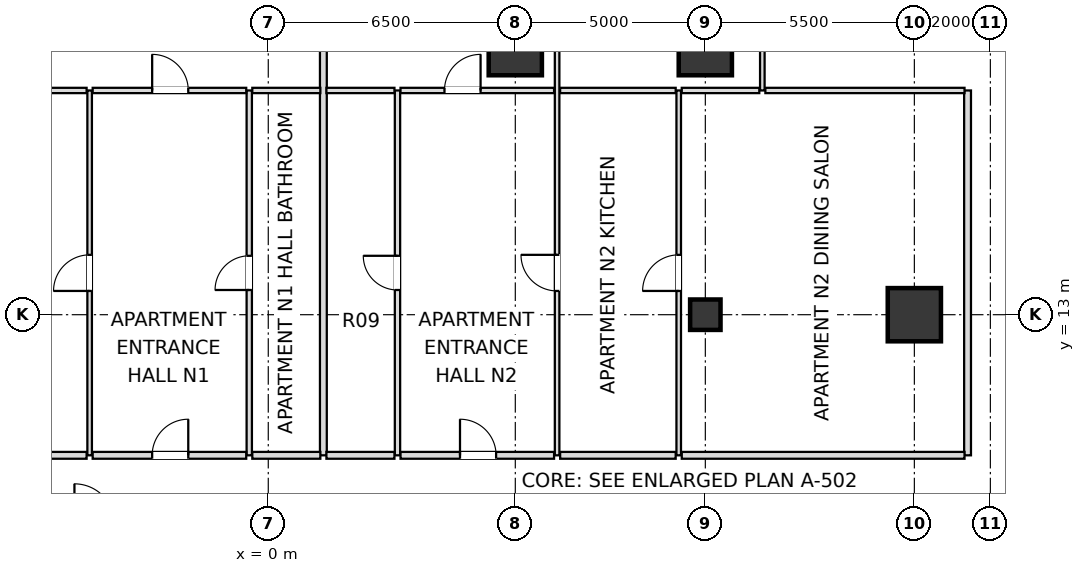
"""IFC4 building model, lengths in metres.
Left out: names, types, materials, properties, quantities, classifications, styles, units other than length and angle.
Written with IfcOpenShell. Run it as: python <this file> out.ifc"""

import sys

from ifc_helpers import new_model, si_unit, direction, frame, frame_2d, origin, origin_2d, place, context, subcontext, project, spatial, rectangle, extrude, element, fill, save


model = new_model("IFC4")
c1 = context("Model", 3, precision=1e-05, world=origin(), true_north=direction((0.0, 1.0)))
c2 = subcontext(c1, "Body", "Model", "MODEL_VIEW")
j1 = project(units=[si_unit("LENGTHUNIT", "METRE"), si_unit("PLANEANGLEUNIT", "RADIAN")], contexts=[c1])
p1 = place(None, origin())
s1 = spatial("IfcSite", under=j1, at=p1, CompositionType="ELEMENT")
p2 = place(p1, origin())
s2 = spatial("IfcBuilding", under=s1, at=p2, CompositionType="ELEMENT")
p3 = place(p2, frame((0.0, 0.0, 27.6)))
s3 = spatial("IfcBuildingStorey", under=s2, at=p3, CompositionType="ELEMENT", Elevation=27.6)
for number, where, z_axis, x_axis in (
    (1, (17.0, 13.0, 0.0), (0.0, 0.0, 1.0), (1.0, 0.0, 0.0)),
    (2, (11.5, 20.0, 0.0), (0.0, 0.0, 1.0), (1.0, 0.0, 0.0)),
    (3, (6.5, 20.0, 0.0), (0.0, 0.0, 1.0), (1.0, 0.0, 0.0)),
):
    element("IfcColumn", number, at=place(p3, frame(where, z_axis=z_axis, x_axis=x_axis)), inside=s3, PredefinedType="USERDEFINED", context=c2, shape_type="SweptSolid", body=[
        extrude(rectangle(XDim=1.4, YDim=1.4, at=origin_2d()), origin(), (0.0, 0.0, 1.0), 4.8),
    ])
p4 = place(p3, frame((11.5, 13.0, 0.0), z_axis=(0.0, 0.0, 1.0), x_axis=(1.0, 0.0, 0.0)))
e4 = element("IfcColumn", 4, at=p4, inside=s3, PredefinedType="COLUMN", context=c2, shape_type="SweptSolid", body=[
    extrude(rectangle(XDim=0.8, YDim=0.8, at=origin_2d()), origin(), (0.0, 0.0, 1.0), 4.8),
])
p5 = place(p3, frame((-4.7, 9.3, 0.0), z_axis=(0.0, 0.0, 1.0), x_axis=(0.0, 1.0, 0.0)))
e5 = element("IfcWall", 5, at=p5, inside=s3, PredefinedType="PARTITIONING", context=c2, shape_type="SweptSolid", body=[
    extrude(rectangle(XDim=9.6, YDim=0.12, at=frame_2d((4.8, 0.0))), origin(), (0.0, 0.0, 1.0), 4.148),
])
p6 = place(p5, frame((4.325, 0.0, 0.0)))
e6 = element("IfcOpeningElement", 6, at=p6, cuts=e5, PredefinedType="OPENING", context=c2, shape_type="SweptSolid", body=[
    extrude(rectangle(XDim=0.95, YDim=2.1, at=frame_2d((0.475, 1.05))), frame((0.0, 0.07, 0.0), z_axis=(0.0, -1.0, 0.0), x_axis=(1.0, 0.0, 0.0)), (0.0, 0.0, 1.0), 0.14),
])
p7 = place(p3, frame((-0.5, 9.3, 0.0), z_axis=(0.0, 0.0, 1.0), x_axis=(0.0, 1.0, 0.0)))
e7 = element("IfcWall", 7, at=p7, inside=s3, PredefinedType="PARTITIONING", context=c2, shape_type="SweptSolid", body=[
    extrude(rectangle(XDim=9.6, YDim=0.14, at=frame_2d((4.8, 0.0))), origin(), (0.0, 0.0, 1.0), 4.148),
])
p8 = place(p7, frame((4.35, 0.0, 0.0)))
e8 = element("IfcOpeningElement", 8, at=p8, cuts=e7, PredefinedType="OPENING", context=c2, shape_type="SweptSolid", body=[
    extrude(rectangle(XDim=0.9, YDim=2.1, at=frame_2d((0.45, 1.05))), frame((0.0, 0.08, 0.0), z_axis=(0.0, -1.0, 0.0), x_axis=(1.0, 0.0, 0.0)), (0.0, 0.0, 1.0), 0.16),
])
p9 = place(p3, frame((1.45, 9.3, 0.0), z_axis=(0.0, 0.0, 1.0), x_axis=(0.0, 1.0, 0.0)))
e9 = element("IfcWall", 9, at=p9, inside=s3, PredefinedType="PARTITIONING", context=c2, shape_type="SweptSolid", body=[
    extrude(rectangle(XDim=15.6, YDim=0.18, at=frame_2d((7.8, 0.0))), origin(), (0.0, 0.0, 1.0), 4.016),
])
p10 = place(p3, frame((3.4, 9.3, 0.0), z_axis=(0.0, 0.0, 1.0), x_axis=(0.0, 1.0, 0.0)))
e10 = element("IfcWall", 10, at=p10, inside=s3, PredefinedType="PARTITIONING", context=c2, shape_type="SweptSolid", body=[
    extrude(rectangle(XDim=9.6, YDim=0.14, at=frame_2d((4.8, 0.0))), origin(), (0.0, 0.0, 1.0), 4.148),
])
p11 = place(p10, frame((4.35, 0.0, 0.0)))
e11 = element("IfcOpeningElement", 11, at=p11, cuts=e10, PredefinedType="OPENING", context=c2, shape_type="SweptSolid", body=[
    extrude(rectangle(XDim=0.9, YDim=2.1, at=frame_2d((0.45, 1.05))), frame((0.0, 0.08, 0.0), z_axis=(0.0, -1.0, 0.0), x_axis=(1.0, 0.0, 0.0)), (0.0, 0.0, 1.0), 0.16),
])
p12 = place(p3, frame((7.6, 9.3, 0.0), z_axis=(0.0, 0.0, 1.0), x_axis=(0.0, 1.0, 0.0)))
e12 = element("IfcWall", 12, at=p12, inside=s3, PredefinedType="PARTITIONING", context=c2, shape_type="SweptSolid", body=[
    extrude(rectangle(XDim=15.6, YDim=0.12, at=frame_2d((7.8, 0.0))), origin(), (0.0, 0.0, 1.0), 4.016),
])
p13 = place(p12, frame((4.325, 0.0, 0.0)))
e13 = element("IfcOpeningElement", 13, at=p13, cuts=e12, PredefinedType="OPENING", context=c2, shape_type="SweptSolid", body=[
    extrude(rectangle(XDim=0.95, YDim=2.1, at=frame_2d((0.475, 1.05))), frame((0.0, 0.07, 0.0), z_axis=(0.0, -1.0, 0.0), x_axis=(1.0, 0.0, 0.0)), (0.0, 0.0, 1.0), 0.14),
])
p14 = place(p12, frame((12.15, 0.0, 0.0)))
e14 = element("IfcOpeningElement", 14, at=p14, cuts=e12, PredefinedType="OPENING", context=c2, shape_type="SweptSolid", body=[
    extrude(rectangle(XDim=0.9, YDim=2.1, at=frame_2d((0.45, 1.05))), frame((0.0, 0.07, 0.0), z_axis=(0.0, -1.0, 0.0), x_axis=(1.0, 0.0, 0.0)), (0.0, 0.0, 1.0), 0.14),
])
p15 = place(p3, frame((10.8, 9.3, 0.0), z_axis=(0.0, 0.0, 1.0), x_axis=(0.0, 1.0, 0.0)))
e15 = element("IfcWall", 15, at=p15, inside=s3, PredefinedType="PARTITIONING", context=c2, shape_type="SweptSolid", body=[
    extrude(rectangle(XDim=9.6, YDim=0.12, at=frame_2d((4.8, 0.0))), origin(), (0.0, 0.0, 1.0), 4.016),
])
p16 = place(p15, frame((4.325, 0.0, 0.0)))
e16 = element("IfcOpeningElement", 16, at=p16, cuts=e15, PredefinedType="OPENING", context=c2, shape_type="SweptSolid", body=[
    extrude(rectangle(XDim=0.95, YDim=2.1, at=frame_2d((0.475, 1.05))), frame((0.0, 0.07, 0.0), z_axis=(0.0, -1.0, 0.0), x_axis=(1.0, 0.0, 0.0)), (0.0, 0.0, 1.0), 0.14),
])
p17 = place(p3, frame((13.0, 18.9, 0.0), z_axis=(0.0, 0.0, 1.0), x_axis=(0.0, 1.0, 0.0)))
e17 = element("IfcWall", 17, at=p17, inside=s3, PredefinedType="PARTITIONING", context=c2, shape_type="SweptSolid", body=[
    extrude(rectangle(XDim=6.0, YDim=0.12, at=frame_2d((3.0, 0.0))), origin(), (0.0, 0.0, 1.0), 3.936),
])
p18 = place(p17, frame((2.55, 0.0, 0.0)))
e18 = element("IfcOpeningElement", 18, at=p18, cuts=e17, PredefinedType="OPENING", context=c2, shape_type="SweptSolid", body=[
    extrude(rectangle(XDim=0.9, YDim=2.1, at=frame_2d((0.45, 1.05))), frame((0.0, 0.07, 0.0), z_axis=(0.0, -1.0, 0.0), x_axis=(1.0, 0.0, 0.0)), (0.0, 0.0, 1.0), 0.14),
])
p19 = place(p3, frame((18.4, 9.3, 0.0), z_axis=(0.0, 0.0, 1.0), x_axis=(0.0, 1.0, 0.0)))
e19 = element("IfcWall", 19, at=p19, inside=s3, PredefinedType="PARTITIONING", context=c2, shape_type="SweptSolid", body=[
    extrude(rectangle(XDim=9.6, YDim=0.18, at=frame_2d((4.8, 0.0))), origin(), (0.0, 0.0, 1.0), 3.936),
])
p20 = place(p3, frame((-7.82, 9.3, 0.0), z_axis=(0.0, 0.0, 1.0), x_axis=(1.0, 0.0, 0.0)))
e20 = element("IfcWall", 20, at=p20, inside=s3, PredefinedType="PARTITIONING", context=c2, shape_type="SweptSolid", body=[
    extrude(rectangle(XDim=3.04, YDim=0.18, at=frame_2d((1.52, 0.0))), origin(), (0.0, 0.0, 1.0), 4.016),
])
p21 = place(p3, frame((-4.62, 9.3, 0.0), z_axis=(0.0, 0.0, 1.0), x_axis=(1.0, 0.0, 0.0)))
e21 = element("IfcWall", 21, at=p21, inside=s3, PredefinedType="PARTITIONING", context=c2, shape_type="SweptSolid", body=[
    extrude(rectangle(XDim=4.04, YDim=0.18, at=frame_2d((2.02, 0.0))), origin(), (0.0, 0.0, 1.0), 4.58),
])
p22 = place(p21, frame((1.565, 0.0, 0.0)))
e22 = element("IfcOpeningElement", 22, at=p22, cuts=e21, PredefinedType="OPENING", context=c2, shape_type="SweptSolid", body=[
    extrude(rectangle(XDim=0.95, YDim=2.15, at=frame_2d((0.475, 1.075))), frame((0.0, 0.1, 0.0), z_axis=(0.0, -1.0, 0.0), x_axis=(1.0, 0.0, 0.0)), (0.0, 0.0, 1.0), 0.2),
])
for number, where, z_axis, x_axis in (
    (23, (-0.42, 9.3, 0.0), (0.0, 0.0, 1.0), (1.0, 0.0, 0.0)),
    (24, (1.53, 9.3, 0.0), (0.0, 0.0, 1.0), (1.0, 0.0, 0.0)),
):
    element("IfcWall", number, at=place(p3, frame(where, z_axis=z_axis, x_axis=x_axis)), inside=s3, PredefinedType="PARTITIONING", context=c2, shape_type="SweptSolid", body=[
        extrude(rectangle(XDim=1.79, YDim=0.18, at=frame_2d((0.895, 0.0))), origin(), (0.0, 0.0, 1.0), 4.58),
    ])
p23 = place(p3, frame((3.48, 9.3, 0.0), z_axis=(0.0, 0.0, 1.0), x_axis=(1.0, 0.0, 0.0)))
e25 = element("IfcWall", 25, at=p23, inside=s3, PredefinedType="PARTITIONING", context=c2, shape_type="SweptSolid", body=[
    extrude(rectangle(XDim=4.04, YDim=0.18, at=frame_2d((2.02, 0.0))), origin(), (0.0, 0.0, 1.0), 4.016),
])
p24 = place(p23, frame((1.565, 0.0, 0.0)))
e26 = element("IfcOpeningElement", 26, at=p24, cuts=e25, PredefinedType="OPENING", context=c2, shape_type="SweptSolid", body=[
    extrude(rectangle(XDim=0.95, YDim=2.15, at=frame_2d((0.475, 1.075))), frame((0.0, 0.1, 0.0), z_axis=(0.0, -1.0, 0.0), x_axis=(1.0, 0.0, 0.0)), (0.0, 0.0, 1.0), 0.2),
])
p25 = place(p3, frame((7.68, 9.3, 0.0), z_axis=(0.0, 0.0, 1.0), x_axis=(1.0, 0.0, 0.0)))
e27 = element("IfcWall", 27, at=p25, inside=s3, PredefinedType="PARTITIONING", context=c2, shape_type="SweptSolid", body=[
    extrude(rectangle(XDim=3.04, YDim=0.18, at=frame_2d((1.52, 0.0))), origin(), (0.0, 0.0, 1.0), 4.58),
])
p26 = place(p3, frame((10.88, 9.3, 0.0), z_axis=(0.0, 0.0, 1.0), x_axis=(1.0, 0.0, 0.0)))
e28 = element("IfcWall", 28, at=p26, inside=s3, PredefinedType="PARTITIONING", context=c2, shape_type="SweptSolid", body=[
    extrude(rectangle(XDim=7.44, YDim=0.18, at=frame_2d((3.72, 0.0))), origin(), (0.0, 0.0, 1.0), 4.016),
])
p27 = place(p3, frame((-6.67, 18.9, 0.0), z_axis=(0.0, 0.0, 1.0), x_axis=(1.0, 0.0, 0.0)))
e29 = element("IfcWall", 29, at=p27, inside=s3, PredefinedType="PARTITIONING", context=c2, shape_type="SweptSolid", body=[
    extrude(rectangle(XDim=1.89, YDim=0.14, at=frame_2d((0.945, 0.0))), origin(), (0.0, 0.0, 1.0), 4.016),
])
p28 = place(p3, frame((-4.62, 18.9, 0.0), z_axis=(0.0, 0.0, 1.0), x_axis=(1.0, 0.0, 0.0)))
e30 = element("IfcWall", 30, at=p28, inside=s3, PredefinedType="PARTITIONING", context=c2, shape_type="SweptSolid", body=[
    extrude(rectangle(XDim=4.04, YDim=0.14, at=frame_2d((2.02, 0.0))), origin(), (0.0, 0.0, 1.0), 4.58),
])
p29 = place(p28, frame((1.565, 0.0, 0.0)))
e31 = element("IfcOpeningElement", 31, at=p29, cuts=e30, PredefinedType="OPENING", context=c2, shape_type="SweptSolid", body=[
    extrude(rectangle(XDim=0.95, YDim=2.1, at=frame_2d((0.475, 1.05))), frame((0.0, 0.08, 0.0), z_axis=(0.0, -1.0, 0.0), x_axis=(1.0, 0.0, 0.0)), (0.0, 0.0, 1.0), 0.16),
])
for number, where, z_axis, x_axis in (
    (32, (-0.42, 18.9, 0.0), (0.0, 0.0, 1.0), (1.0, 0.0, 0.0)),
    (33, (1.53, 18.9, 0.0), (0.0, 0.0, 1.0), (1.0, 0.0, 0.0)),
):
    element("IfcWall", number, at=place(p3, frame(where, z_axis=z_axis, x_axis=x_axis)), inside=s3, PredefinedType="PARTITIONING", context=c2, shape_type="SweptSolid", body=[
        extrude(rectangle(XDim=1.79, YDim=0.14, at=frame_2d((0.895, 0.0))), origin(), (0.0, 0.0, 1.0), 4.58),
    ])
p30 = place(p3, frame((3.48, 18.9, 0.0), z_axis=(0.0, 0.0, 1.0), x_axis=(1.0, 0.0, 0.0)))
e34 = element("IfcWall", 34, at=p30, inside=s3, PredefinedType="PARTITIONING", context=c2, shape_type="SweptSolid", body=[
    extrude(rectangle(XDim=4.04, YDim=0.14, at=frame_2d((2.02, 0.0))), origin(), (0.0, 0.0, 1.0), 4.016),
])
p31 = place(p30, frame((1.156, 0.0, 0.0)))
e35 = element("IfcOpeningElement", 35, at=p31, cuts=e34, PredefinedType="OPENING", context=c2, shape_type="SweptSolid", body=[
    extrude(rectangle(XDim=0.95, YDim=2.1, at=frame_2d((0.475, 1.05))), frame((0.0, 0.08, 0.0), z_axis=(0.0, -1.0, 0.0), x_axis=(1.0, 0.0, 0.0)), (0.0, 0.0, 1.0), 0.16),
])
p32 = place(p3, frame((7.68, 18.9, 0.0), z_axis=(0.0, 0.0, 1.0), x_axis=(1.0, 0.0, 0.0)))
e36 = element("IfcWall", 36, at=p32, inside=s3, PredefinedType="PARTITIONING", context=c2, shape_type="SweptSolid", body=[
    extrude(rectangle(XDim=3.04, YDim=0.14, at=frame_2d((1.52, 0.0))), origin(), (0.0, 0.0, 1.0), 4.58),
])
p33 = place(p3, frame((10.88, 18.9, 0.0), z_axis=(0.0, 0.0, 1.0), x_axis=(1.0, 0.0, 0.0)))
e37 = element("IfcWall", 37, at=p33, inside=s3, PredefinedType="PARTITIONING", context=c2, shape_type="SweptSolid", body=[
    extrude(rectangle(XDim=2.04, YDim=0.14, at=frame_2d((1.02, 0.0))), origin(), (0.0, 0.0, 1.0), 3.936),
])
p34 = place(p3, frame((13.08, 18.9, 0.0), z_axis=(0.0, 0.0, 1.0), x_axis=(1.0, 0.0, 0.0)))
e38 = element("IfcWall", 38, at=p34, inside=s3, PredefinedType="PARTITIONING", context=c2, shape_type="SweptSolid", body=[
    extrude(rectangle(XDim=5.24, YDim=0.14, at=frame_2d((2.62, 0.0))), origin(), (0.0, 0.0, 1.0), 3.936),
])
p35 = place(p8, origin())
e39 = element("IfcDoor", 39, at=p35, inside=s3, OperationType="SINGLE_SWING_LEFT", PredefinedType="DOOR", context=c2, shape_type="SweptSolid", body=[
    extrude(rectangle(XDim=0.9, YDim=2.1, at=frame_2d((0.45, 1.05))), frame((0.0, 0.025, 0.0), z_axis=(0.0, -1.0, 0.0), x_axis=(1.0, 0.0, 0.0)), (0.0, 0.0, 1.0), 0.05),
])
fill(e8, e39)
p36 = place(p22, origin())
e40 = element("IfcDoor", 40, at=p36, inside=s3, OperationType="SINGLE_SWING_RIGHT", PredefinedType="DOOR", context=c2, shape_type="SweptSolid", body=[
    extrude(rectangle(XDim=0.95, YDim=2.15, at=frame_2d((0.475, 1.075))), frame((0.0, 0.025, 0.0), z_axis=(0.0, -1.0, 0.0), x_axis=(1.0, 0.0, 0.0)), (0.0, 0.0, 1.0), 0.05),
])
fill(e22, e40)
p37 = place(p6, origin())
e41 = element("IfcDoor", 41, at=p37, inside=s3, OperationType="SINGLE_SWING_LEFT", PredefinedType="DOOR", context=c2, shape_type="SweptSolid", body=[
    extrude(rectangle(XDim=0.95, YDim=2.1, at=frame_2d((0.475, 1.05))), frame((0.0, 0.025, 0.0), z_axis=(0.0, -1.0, 0.0), x_axis=(1.0, 0.0, 0.0)), (0.0, 0.0, 1.0), 0.05),
])
fill(e6, e41)
p38 = place(p29, origin())
e42 = element("IfcDoor", 42, at=p38, inside=s3, OperationType="SINGLE_SWING_LEFT", PredefinedType="DOOR", context=c2, shape_type="SweptSolid", body=[
    extrude(rectangle(XDim=0.95, YDim=2.1, at=frame_2d((0.475, 1.05))), frame((0.0, 0.025, 0.0), z_axis=(0.0, -1.0, 0.0), x_axis=(1.0, 0.0, 0.0)), (0.0, 0.0, 1.0), 0.05),
])
fill(e31, e42)
p39 = place(p11, origin())
e43 = element("IfcDoor", 43, at=p39, inside=s3, OperationType="SINGLE_SWING_RIGHT", PredefinedType="DOOR", context=c2, shape_type="SweptSolid", body=[
    extrude(rectangle(XDim=0.9, YDim=2.1, at=frame_2d((0.45, 1.05))), frame((0.0, 0.025, 0.0), z_axis=(0.0, -1.0, 0.0), x_axis=(1.0, 0.0, 0.0)), (0.0, 0.0, 1.0), 0.05),
])
fill(e11, e43)
p40 = place(p24, origin())
e44 = element("IfcDoor", 44, at=p40, inside=s3, OperationType="SINGLE_SWING_LEFT", PredefinedType="DOOR", context=c2, shape_type="SweptSolid", body=[
    extrude(rectangle(XDim=0.95, YDim=2.15, at=frame_2d((0.475, 1.075))), frame((0.0, 0.025, 0.0), z_axis=(0.0, -1.0, 0.0), x_axis=(1.0, 0.0, 0.0)), (0.0, 0.0, 1.0), 0.05),
])
fill(e26, e44)
p41 = place(p13, origin())
e45 = element("IfcDoor", 45, at=p41, inside=s3, OperationType="SINGLE_SWING_RIGHT", PredefinedType="DOOR", context=c2, shape_type="SweptSolid", body=[
    extrude(rectangle(XDim=0.95, YDim=2.1, at=frame_2d((0.475, 1.05))), frame((0.0, 0.025, 0.0), z_axis=(0.0, -1.0, 0.0), x_axis=(1.0, 0.0, 0.0)), (0.0, 0.0, 1.0), 0.05),
])
fill(e13, e45)
p42 = place(p16, origin())
e46 = element("IfcDoor", 46, at=p42, inside=s3, OperationType="SINGLE_SWING_LEFT", PredefinedType="DOOR", context=c2, shape_type="SweptSolid", body=[
    extrude(rectangle(XDim=0.95, YDim=2.1, at=frame_2d((0.475, 1.05))), frame((0.0, 0.025, 0.0), z_axis=(0.0, -1.0, 0.0), x_axis=(1.0, 0.0, 0.0)), (0.0, 0.0, 1.0), 0.05),
])
fill(e16, e46)
p43 = place(p31, origin())
e47 = element("IfcDoor", 47, at=p43, inside=s3, OperationType="SINGLE_SWING_RIGHT", PredefinedType="DOOR", context=c2, shape_type="SweptSolid", body=[
    extrude(rectangle(XDim=0.95, YDim=2.1, at=frame_2d((0.475, 1.05))), frame((0.0, 0.025, 0.0), z_axis=(0.0, -1.0, 0.0), x_axis=(1.0, 0.0, 0.0)), (0.0, 0.0, 1.0), 0.05),
])
fill(e35, e47)
save(model, sys.argv[1])
